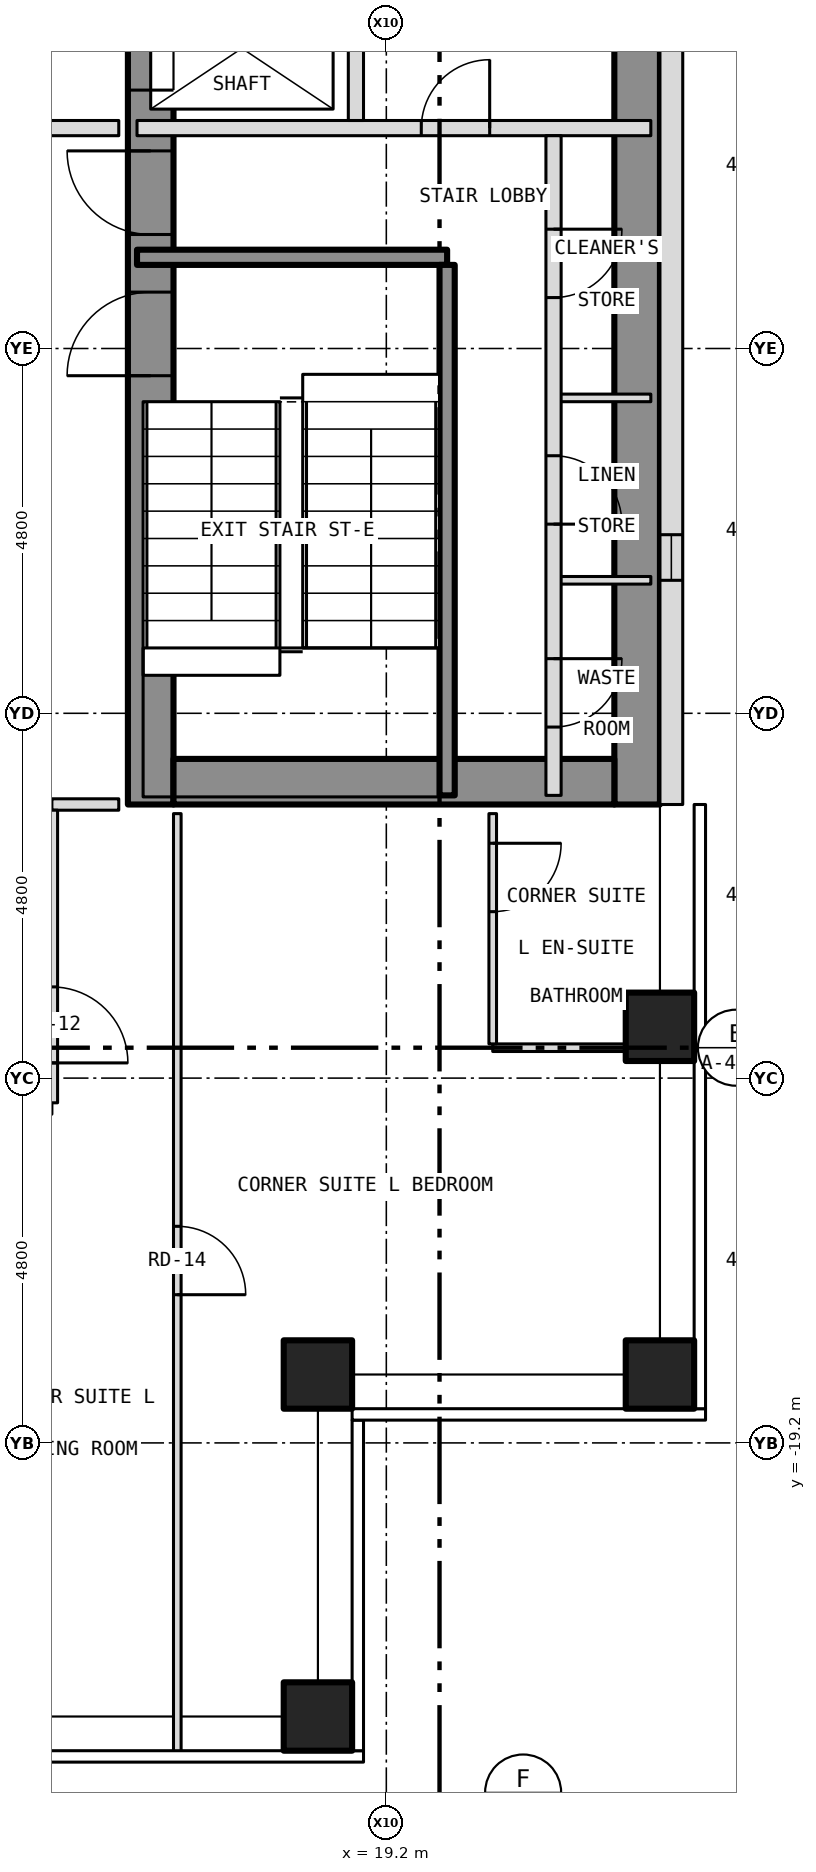
"""IFC4 building model, lengths in metres.
Left out: names, types, materials, properties, quantities, classifications, styles, units other than length and angle.
Written with IfcOpenShell. Run it as: python <this file> out.ifc"""

import sys

from ifc_helpers import new_model, si_unit, direction, frame, frame_2d, origin, origin_2d, place, context, subcontext, project, spatial, rectangle, hollow_rectangle, extrude, element, fill, save


model = new_model("IFC4")
c1 = context("Model", 3, precision=1e-05, world=origin(), true_north=direction((0.0, 1.0)))
c2 = subcontext(c1, "Body", "Model", "MODEL_VIEW")
j1 = project(units=[si_unit("LENGTHUNIT", "METRE"), si_unit("PLANEANGLEUNIT", "RADIAN")], contexts=[c1])
p1 = place(None, origin())
s1 = spatial("IfcSite", under=j1, at=p1, CompositionType="ELEMENT")
p2 = place(p1, origin())
s2 = spatial("IfcBuilding", under=s1, at=p2, CompositionType="ELEMENT")
p3 = place(p2, frame((0.0, 0.0, 96.0)))
s3 = spatial("IfcBuildingStorey", under=s2, at=p3, CompositionType="ELEMENT", Elevation=96.0)
for number, where, z_axis, x_axis in (
    (1, (18.3, -22.8, -0.15), (0.0, 0.0, 1.0), (1.0, 0.0, 0.0)),
    (2, (22.8, -18.3, -0.15), (0.0, 0.0, 1.0), (1.0, 0.0, 0.0)),
    (3, (22.8, -13.725, -0.15), (0.0, 0.0, 1.0), (1.0, 0.0, 0.0)),
    (4, (18.3, -18.3, -0.15), (0.0, 0.0, 1.0), (1.0, 0.0, 0.0)),
):
    element("IfcColumn", number, at=place(p3, frame(where, z_axis=z_axis, x_axis=x_axis)), inside=s3, PredefinedType="COLUMN", context=c2, shape_type="SweptSolid", body=[
        extrude(hollow_rectangle(XDim=0.9, YDim=0.9, WallThickness=0.05, at=origin_2d()), origin(), (0.0, 0.0, 1.0), 3.5),
    ])
p4 = place(p3, frame((16.1, -10.8, 0.0), z_axis=(0.0, 0.0, 1.0), x_axis=(0.0, 1.0, 0.0)))
e5 = element("IfcWall", 5, at=p4, inside=s3, PredefinedType="SHEAR", context=c2, shape_type="SweptSolid", body=[
    extrude(rectangle(XDim=21.6, YDim=0.6, at=frame_2d((10.8, 0.0))), origin(), (0.0, 0.0, 1.0), 3.25),
])
p5 = place(p4, frame((9.4, 0.0, 0.0)))
e6 = element("IfcOpeningElement", 6, at=p5, cuts=e5, PredefinedType="OPENING", context=c2, shape_type="SweptSolid", body=[
    extrude(rectangle(XDim=1.1, YDim=2.1, at=frame_2d((0.55, 1.05))), frame((0.0, 0.312, 0.0), z_axis=(0.0, -1.0, 0.0), x_axis=(1.0, 0.0, 0.0)), (0.0, 0.0, 1.0), 0.624),
])
p6 = place(p4, frame((11.5, 0.0, 0.0)))
e7 = element("IfcOpeningElement", 7, at=p6, cuts=e5, PredefinedType="OPENING", context=c2, shape_type="SweptSolid", body=[
    extrude(rectangle(XDim=1.1, YDim=2.1, at=frame_2d((0.55, 1.05))), frame((0.0, 0.312, 0.0), z_axis=(0.0, -1.0, 0.0), x_axis=(1.0, 0.0, 0.0)), (0.0, 0.0, 1.0), 0.624),
])
p7 = place(p4, frame((13.6, 0.0, 0.0)))
e8 = element("IfcOpeningElement", 8, at=p7, cuts=e5, PredefinedType="OPENING", context=c2, shape_type="SweptSolid", body=[
    extrude(rectangle(XDim=1.1, YDim=2.1, at=frame_2d((0.55, 1.05))), frame((0.0, 0.312, 0.0), z_axis=(0.0, -1.0, 0.0), x_axis=(1.0, 0.0, 0.0)), (0.0, 0.0, 1.0), 0.624),
])
p8 = place(p4, frame((15.7, 0.0, 0.0)))
e9 = element("IfcOpeningElement", 9, at=p8, cuts=e5, PredefinedType="OPENING", context=c2, shape_type="SweptSolid", body=[
    extrude(rectangle(XDim=1.1, YDim=2.1, at=frame_2d((0.55, 1.05))), frame((0.0, 0.312, 0.0), z_axis=(0.0, -1.0, 0.0), x_axis=(1.0, 0.0, 0.0)), (0.0, 0.0, 1.0), 0.624),
])
p9 = place(p4, frame((17.8, 0.0, 0.0)))
e10 = element("IfcOpeningElement", 10, at=p9, cuts=e5, PredefinedType="OPENING", context=c2, shape_type="SweptSolid", body=[
    extrude(rectangle(XDim=1.1, YDim=2.1, at=frame_2d((0.55, 1.05))), frame((0.0, 0.312, 0.0), z_axis=(0.0, -1.0, 0.0), x_axis=(1.0, 0.0, 0.0)), (0.0, 0.0, 1.0), 0.624),
])
p10 = place(p4, frame((5.642, 0.0, 0.0)))
e11 = element("IfcOpeningElement", 11, at=p10, cuts=e5, PredefinedType="OPENING", context=c2, shape_type="SweptSolid", body=[
    extrude(rectangle(XDim=1.1, YDim=2.1, at=frame_2d((0.55, 1.05))), frame((0.0, 0.312, 0.0), z_axis=(0.0, -1.0, 0.0), x_axis=(1.0, 0.0, 0.0)), (0.0, 0.0, 1.0), 0.624),
])
p11 = place(p4, frame((7.5, 0.0, 0.0)))
e12 = element("IfcOpeningElement", 12, at=p11, cuts=e5, PredefinedType="OPENING", context=c2, shape_type="SweptSolid", body=[
    extrude(rectangle(XDim=1.1, YDim=2.1, at=frame_2d((0.55, 1.05))), frame((0.0, 0.312, 0.0), z_axis=(0.0, -1.0, 0.0), x_axis=(1.0, 0.0, 0.0)), (0.0, 0.0, 1.0), 0.624),
])
p12 = place(p3, frame((22.5, -10.8, 0.0), z_axis=(0.0, 0.0, 1.0), x_axis=(0.0, 1.0, 0.0)))
e13 = element("IfcWall", 13, at=p12, inside=s3, PredefinedType="SHEAR", context=c2, shape_type="SweptSolid", body=[
    extrude(rectangle(XDim=21.6, YDim=0.6, at=frame_2d((10.8, 0.0))), origin(), (0.0, 0.0, 1.0), 3.25),
])
p13 = place(p3, frame((16.4, -10.5, 0.0), z_axis=(0.0, 0.0, 1.0), x_axis=(1.0, 0.0, 0.0)))
e14 = element("IfcWall", 14, at=p13, inside=s3, PredefinedType="SHEAR", context=c2, shape_type="SweptSolid", body=[
    extrude(rectangle(XDim=5.8, YDim=0.6, at=frame_2d((2.9, 0.0))), origin(), (0.0, 0.0, 1.0), 3.25),
])
p14 = place(p3, frame((22.95, -10.8, 0.0), z_axis=(0.0, 0.0, 1.0), x_axis=(0.0, 1.0, 0.0)))
e15 = element("IfcWall", 15, at=p14, inside=s3, PredefinedType="SOLIDWALL", context=c2, shape_type="SweptSolid", body=[
    extrude(rectangle(XDim=21.6, YDim=0.3, at=frame_2d((10.8, 0.0))), origin(), (0.0, 0.0, 1.0), 3.5),
])
p15 = place(p14, frame((2.95, 0.0, 1.0)))
e16 = element("IfcOpeningElement", 16, at=p15, cuts=e15, PredefinedType="OPENING", context=c2, shape_type="SweptSolid", body=[
    extrude(rectangle(XDim=0.6, YDim=1.5, at=frame_2d((0.3, 0.75))), frame((0.0, 0.162, 0.0), z_axis=(0.0, -1.0, 0.0), x_axis=(1.0, 0.0, 0.0)), (0.0, 0.0, 1.0), 0.324),
])
p16 = place(p3, frame((20.6, -14.0, 0.0), z_axis=(0.0, 0.0, 1.0), x_axis=(1.0, 0.0, 0.0)))
e17 = element("IfcWall", 17, at=p16, inside=s3, PredefinedType="PARTITIONING", context=c2, shape_type="SweptSolid", body=[
    extrude(rectangle(XDim=2.08, YDim=0.1, at=frame_2d((1.04, 0.0))), origin(), (0.0, 0.0, 1.0), 3.35),
])
p17 = place(p3, frame((14.8, -10.8, 0.0), z_axis=(0.0, 0.0, 1.0), x_axis=(1.0, 0.0, 0.0)))
e18 = element("IfcWall", 18, at=p17, inside=s3, PredefinedType="PARTITIONING", context=c2, shape_type="SweptSolid", body=[
    extrude(rectangle(XDim=0.88, YDim=0.15, at=frame_2d((0.44, 0.0))), origin(), (0.0, 0.0, 1.0), 3.35),
])
for number, where, z_axis, x_axis in (
    (19, (21.4, -7.85, 0.0), (0.0, 0.0, 1.0), (1.0, 0.0, 0.0)),
    (20, (21.4, -5.45, 0.0), (0.0, 0.0, 1.0), (1.0, 0.0, 0.0)),
):
    element("IfcWall", number, at=place(p3, frame(where, z_axis=z_axis, x_axis=x_axis)), inside=s3, PredefinedType="PARTITIONING", context=c2, shape_type="SweptSolid", body=[
        extrude(rectangle(XDim=1.28, YDim=0.1, at=frame_2d((0.64, 0.0))), origin(), (0.0, 0.0, 1.0), 3.25),
    ])
p18 = place(p3, frame((15.92, -3.6, 0.0), z_axis=(0.0, 0.0, 1.0), x_axis=(1.0, 0.0, 0.0)))
e21 = element("IfcWall", 21, at=p18, inside=s3, PredefinedType="SHEAR", context=c2, shape_type="SweptSolid", body=[
    extrude(rectangle(XDim=4.08, YDim=0.2, at=frame_2d((2.04, 0.0))), origin(), (0.0, 0.0, 1.0), 3.25),
])
p19 = place(p3, frame((12.4, -1.9, 0.0), z_axis=(0.0, 0.0, 1.0), x_axis=(1.0, 0.0, 0.0)))
e22 = element("IfcWall", 22, at=p19, inside=s3, PredefinedType="PARTITIONING", context=c2, shape_type="SweptSolid", body=[
    extrude(rectangle(XDim=3.28, YDim=0.2, at=frame_2d((1.64, 0.0))), origin(), (0.0, 0.0, 1.0), 3.35),
])
p20 = place(p19, frame((1.24, 0.0, 0.0)))
e23 = element("IfcOpeningElement", 23, at=p20, cuts=e22, PredefinedType="OPENING", context=c2, shape_type="SweptSolid", body=[
    extrude(rectangle(XDim=1.1, YDim=2.1, at=frame_2d((0.55, 1.05))), frame((0.0, 0.112, 0.0), z_axis=(0.0, -1.0, 0.0), x_axis=(1.0, 0.0, 0.0)), (0.0, 0.0, 1.0), 0.224),
])
p21 = place(p3, frame((15.92, -1.9, 0.0), z_axis=(0.0, 0.0, 1.0), x_axis=(1.0, 0.0, 0.0)))
e24 = element("IfcWall", 24, at=p21, inside=s3, PredefinedType="PARTITIONING", context=c2, shape_type="SweptSolid", body=[
    extrude(rectangle(XDim=6.76, YDim=0.2, at=frame_2d((3.38, 0.0))), origin(), (0.0, 0.0, 1.0), 3.25),
])
p22 = place(p21, frame((3.74, 0.0, 0.0)))
e25 = element("IfcOpeningElement", 25, at=p22, cuts=e24, PredefinedType="OPENING", context=c2, shape_type="SweptSolid", body=[
    extrude(rectangle(XDim=0.9, YDim=2.1, at=frame_2d((0.45, 1.05))), frame((0.0, 0.112, 0.0), z_axis=(0.0, -1.0, 0.0), x_axis=(1.0, 0.0, 0.0)), (0.0, 0.0, 1.0), 0.224),
])
p23 = place(p3, frame((14.8, -14.725, 0.0), z_axis=(0.0, 0.0, 1.0), x_axis=(0.0, 1.0, 0.0)))
e26 = element("IfcWall", 26, at=p23, inside=s3, PredefinedType="PARTITIONING", context=c2, shape_type="SweptSolid", body=[
    extrude(rectangle(XDim=3.85, YDim=0.15, at=frame_2d((1.925, 0.0))), origin(), (0.0, 0.0, 1.0), 3.35),
])
p24 = place(p23, frame((0.525, 0.0, 0.0)))
e27 = element("IfcOpeningElement", 27, at=p24, cuts=e26, PredefinedType="OPENING", context=c2, shape_type="SweptSolid", body=[
    extrude(rectangle(XDim=1.0, YDim=2.1, at=frame_2d((0.5, 1.05))), frame((0.0, 0.087, 0.0), z_axis=(0.0, -1.0, 0.0), x_axis=(1.0, 0.0, 0.0)), (0.0, 0.0, 1.0), 0.174),
])
p25 = place(p3, frame((16.45, -23.28, 0.0), z_axis=(0.0, 0.0, 1.0), x_axis=(0.0, 1.0, 0.0)))
e28 = element("IfcWall", 28, at=p25, inside=s3, PredefinedType="PARTITIONING", context=c2, shape_type="SweptSolid", body=[
    extrude(rectangle(XDim=12.36, YDim=0.1, at=frame_2d((6.18, 0.0))), origin(), (0.0, 0.0, 1.0), 3.35),
])
p26 = place(p25, frame((6.03, 0.0, 0.0)))
e29 = element("IfcOpeningElement", 29, at=p26, cuts=e28, PredefinedType="OPENING", context=c2, shape_type="SweptSolid", body=[
    extrude(rectangle(XDim=0.9, YDim=2.1, at=frame_2d((0.45, 1.05))), frame((0.0, 0.062, 0.0), z_axis=(0.0, -1.0, 0.0), x_axis=(1.0, 0.0, 0.0)), (0.0, 0.0, 1.0), 0.124),
])
p27 = place(p3, frame((18.8, -1.8, 0.0), z_axis=(0.0, 0.0, 1.0), x_axis=(0.0, 1.0, 0.0)))
e30 = element("IfcWall", 30, at=p27, inside=s3, PredefinedType="PARTITIONING", context=c2, shape_type="SweptSolid", body=[
    extrude(rectangle(XDim=6.15, YDim=0.2, at=frame_2d((3.075, 0.0))), origin(), (0.0, 0.0, 1.0), 3.25),
])
p28 = place(p3, frame((20.0, -10.68, 0.0), z_axis=(0.0, 0.0, 1.0), x_axis=(0.0, 1.0, 0.0)))
e31 = element("IfcWall", 31, at=p28, inside=s3, PredefinedType="SHEAR", context=c2, shape_type="SweptSolid", body=[
    extrude(rectangle(XDim=6.98, YDim=0.2, at=frame_2d((3.49, 0.0))), origin(), (0.0, 0.0, 1.0), 3.25),
])
p29 = place(p3, frame((20.6, -13.95, 0.0), z_axis=(0.0, 0.0, 1.0), x_axis=(0.0, 1.0, 0.0)))
e32 = element("IfcWall", 32, at=p29, inside=s3, PredefinedType="PARTITIONING", context=c2, shape_type="SweptSolid", body=[
    extrude(rectangle(XDim=3.03, YDim=0.1, at=frame_2d((1.515, 0.0))), origin(), (0.0, 0.0, 1.0), 3.35),
])
p30 = place(p29, frame((1.74, 0.0, 0.0)))
e33 = element("IfcOpeningElement", 33, at=p30, cuts=e32, PredefinedType="OPENING", context=c2, shape_type="SweptSolid", body=[
    extrude(rectangle(XDim=0.9, YDim=2.1, at=frame_2d((0.45, 1.05))), frame((0.0, 0.062, 0.0), z_axis=(0.0, -1.0, 0.0), x_axis=(1.0, 0.0, 0.0)), (0.0, 0.0, 1.0), 0.124),
])
p31 = place(p3, frame((21.4, -10.68, 0.0), z_axis=(0.0, 0.0, 1.0), x_axis=(0.0, 1.0, 0.0)))
e34 = element("IfcWall", 34, at=p31, inside=s3, PredefinedType="PARTITIONING", context=c2, shape_type="SweptSolid", body=[
    extrude(rectangle(XDim=8.68, YDim=0.2, at=frame_2d((4.34, 0.0))), origin(), (0.0, 0.0, 1.0), 3.25),
])
p32 = place(p31, frame((0.899, 0.0, 0.0)))
e35 = element("IfcOpeningElement", 35, at=p32, cuts=e34, PredefinedType="OPENING", context=c2, shape_type="SweptSolid", body=[
    extrude(rectangle(XDim=0.9, YDim=2.1, at=frame_2d((0.45, 1.05))), frame((0.0, 0.112, 0.0), z_axis=(0.0, -1.0, 0.0), x_axis=(1.0, 0.0, 0.0)), (0.0, 0.0, 1.0), 0.224),
])
p33 = place(p31, frame((3.569, 0.0, 0.0)))
e36 = element("IfcOpeningElement", 36, at=p33, cuts=e34, PredefinedType="OPENING", context=c2, shape_type="SweptSolid", body=[
    extrude(rectangle(XDim=0.9, YDim=2.1, at=frame_2d((0.45, 1.05))), frame((0.0, 0.112, 0.0), z_axis=(0.0, -1.0, 0.0), x_axis=(1.0, 0.0, 0.0)), (0.0, 0.0, 1.0), 0.224),
])
p34 = place(p31, frame((6.55, 0.0, 0.0)))
e37 = element("IfcOpeningElement", 37, at=p34, cuts=e34, PredefinedType="OPENING", context=c2, shape_type="SweptSolid", body=[
    extrude(rectangle(XDim=0.9, YDim=2.1, at=frame_2d((0.45, 1.05))), frame((0.0, 0.112, 0.0), z_axis=(0.0, -1.0, 0.0), x_axis=(1.0, 0.0, 0.0)), (0.0, 0.0, 1.0), 0.224),
])
p35 = place(p15, origin())
e38 = element("IfcWindow", 38, at=p35, inside=s3, PartitioningType="SINGLE_PANEL", PredefinedType="WINDOW", context=c2, shape_type="SweptSolid", body=[
    extrude(rectangle(XDim=0.6, YDim=1.5, at=frame_2d((0.3, 0.75))), frame((0.0, -0.06, 0.0), z_axis=(0.0, -1.0, 0.0), x_axis=(1.0, 0.0, 0.0)), (0.0, 0.0, 1.0), 0.06),
])
fill(e16, e38)
p36 = place(p5, origin())
e39 = element("IfcDoor", 39, at=p36, inside=s3, OperationType="SLIDING_TO_LEFT", PredefinedType="DOOR", context=c2, shape_type="SweptSolid", body=[
    extrude(rectangle(XDim=1.1, YDim=2.1, at=frame_2d((0.55, 1.05))), frame((0.0, 0.025, 0.0), z_axis=(0.0, -1.0, 0.0), x_axis=(1.0, 0.0, 0.0)), (0.0, 0.0, 1.0), 0.05),
])
fill(e6, e39)
p37 = place(p10, origin())
e40 = element("IfcDoor", 40, at=p37, inside=s3, OperationType="SINGLE_SWING_LEFT", PredefinedType="DOOR", context=c2, shape_type="SweptSolid", body=[
    extrude(rectangle(XDim=1.1, YDim=2.1, at=frame_2d((0.55, 1.05))), frame((0.0, 0.025, 0.0), z_axis=(0.0, -1.0, 0.0), x_axis=(1.0, 0.0, 0.0)), (0.0, 0.0, 1.0), 0.05),
])
fill(e11, e40)
p38 = place(p11, origin())
e41 = element("IfcDoor", 41, at=p38, inside=s3, OperationType="SINGLE_SWING_RIGHT", PredefinedType="DOOR", context=c2, shape_type="SweptSolid", body=[
    extrude(rectangle(XDim=1.1, YDim=2.1, at=frame_2d((0.55, 1.05))), frame((0.0, 0.025, 0.0), z_axis=(0.0, -1.0, 0.0), x_axis=(1.0, 0.0, 0.0)), (0.0, 0.0, 1.0), 0.05),
])
fill(e12, e41)
p39 = place(p32, origin())
e42 = element("IfcDoor", 42, at=p39, inside=s3, OperationType="SINGLE_SWING_RIGHT", PredefinedType="DOOR", context=c2, shape_type="SweptSolid", body=[
    extrude(rectangle(XDim=0.9, YDim=2.1, at=frame_2d((0.45, 1.05))), frame((0.0, 0.025, 0.0), z_axis=(0.0, -1.0, 0.0), x_axis=(1.0, 0.0, 0.0)), (0.0, 0.0, 1.0), 0.05),
])
fill(e35, e42)
p40 = place(p33, origin())
e43 = element("IfcDoor", 43, at=p40, inside=s3, OperationType="SINGLE_SWING_LEFT", PredefinedType="DOOR", context=c2, shape_type="SweptSolid", body=[
    extrude(rectangle(XDim=0.9, YDim=2.1, at=frame_2d((0.45, 1.05))), frame((0.0, 0.025, 0.0), z_axis=(0.0, -1.0, 0.0), x_axis=(1.0, 0.0, 0.0)), (0.0, 0.0, 1.0), 0.05),
])
fill(e36, e43)
p41 = place(p34, origin())
e44 = element("IfcDoor", 44, at=p41, inside=s3, OperationType="SINGLE_SWING_RIGHT", PredefinedType="DOOR", context=c2, shape_type="SweptSolid", body=[
    extrude(rectangle(XDim=0.9, YDim=2.1, at=frame_2d((0.45, 1.05))), frame((0.0, 0.025, 0.0), z_axis=(0.0, -1.0, 0.0), x_axis=(1.0, 0.0, 0.0)), (0.0, 0.0, 1.0), 0.05),
])
fill(e37, e44)
p42 = place(p22, origin())
e45 = element("IfcDoor", 45, at=p42, inside=s3, OperationType="SINGLE_SWING_RIGHT", PredefinedType="DOOR", context=c2, shape_type="SweptSolid", body=[
    extrude(rectangle(XDim=0.9, YDim=2.1, at=frame_2d((0.45, 1.05))), frame((0.0, 0.025, 0.0), z_axis=(0.0, -1.0, 0.0), x_axis=(1.0, 0.0, 0.0)), (0.0, 0.0, 1.0), 0.05),
])
fill(e25, e45)
p43 = place(p24, origin())
e46 = element("IfcDoor", 46, at=p43, inside=s3, OperationType="SINGLE_SWING_LEFT", PredefinedType="DOOR", context=c2, shape_type="SweptSolid", body=[
    extrude(rectangle(XDim=1.0, YDim=2.1, at=frame_2d((0.5, 1.05))), frame((0.0, 0.025, 0.0), z_axis=(0.0, -1.0, 0.0), x_axis=(1.0, 0.0, 0.0)), (0.0, 0.0, 1.0), 0.05),
])
fill(e27, e46)
p44 = place(p26, origin())
e47 = element("IfcDoor", 47, at=p44, inside=s3, OperationType="SINGLE_SWING_LEFT", PredefinedType="DOOR", context=c2, shape_type="SweptSolid", body=[
    extrude(rectangle(XDim=0.9, YDim=2.1, at=frame_2d((0.45, 1.05))), frame((0.0, 0.025, 0.0), z_axis=(0.0, -1.0, 0.0), x_axis=(1.0, 0.0, 0.0)), (0.0, 0.0, 1.0), 0.05),
])
fill(e29, e47)
p45 = place(p30, origin())
e48 = element("IfcDoor", 48, at=p45, inside=s3, OperationType="SINGLE_SWING_RIGHT", PredefinedType="DOOR", context=c2, shape_type="SweptSolid", body=[
    extrude(rectangle(XDim=0.9, YDim=2.1, at=frame_2d((0.45, 1.05))), frame((0.0, 0.025, 0.0), z_axis=(0.0, -1.0, 0.0), x_axis=(1.0, 0.0, 0.0)), (0.0, 0.0, 1.0), 0.05),
])
fill(e33, e48)
save(model, sys.argv[1])
